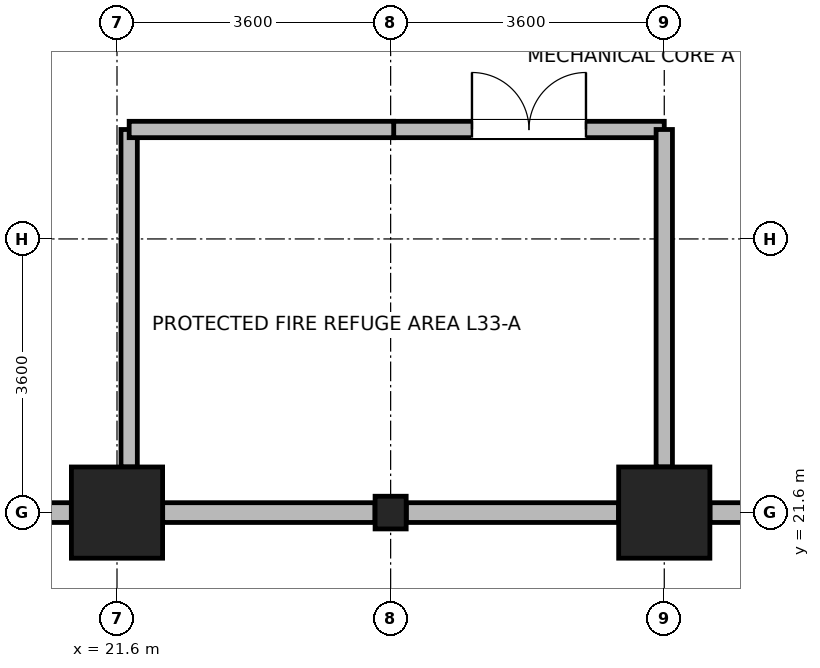
"""IFC4 building model, lengths in metres.
Left out: names, types, materials, properties, quantities, classifications, styles, units other than length and angle.
Written with IfcOpenShell. Run it as: python <this file> out.ifc"""

import sys

from ifc_helpers import new_model, si_unit, direction, frame, frame_2d, origin, origin_2d, place, context, subcontext, project, spatial, rectangle, i_section, extrude, source, transform, mapped, element, fill, save


model = new_model("IFC4")
c1 = context("Model", 3, precision=1e-05, world=origin(), true_north=direction((0.0, 1.0)))
c2 = subcontext(c1, "Body", "Model", "MODEL_VIEW")
j1 = project(units=[si_unit("LENGTHUNIT", "METRE"), si_unit("PLANEANGLEUNIT", "RADIAN")], contexts=[c1])
p1 = place(None, origin())
s1 = spatial("IfcSite", under=j1, at=p1, CompositionType="ELEMENT")
p2 = place(p1, origin())
s2 = spatial("IfcBuilding", under=s1, at=p2, CompositionType="ELEMENT")
p3 = place(p2, frame((0.0, 0.0, 130.4)))
s3 = spatial("IfcBuildingStorey", under=s2, at=p3, CompositionType="ELEMENT", Elevation=130.4)
m1 = source(origin(), c2, "Body", "SweptSolid", [
    extrude(rectangle(XDim=1.2, YDim=1.2, at=origin_2d()), origin(), (0.0, 0.0, 1.0), 5.2),
])
for number, where, z_axis, x_axis in (
    (1, (21.6, 21.6, 0.0), (0.0, 0.0, 1.0), (1.0, 0.0, 0.0)),
    (2, (28.8, 21.6, 0.0), (0.0, 0.0, 1.0), (1.0, 0.0, 0.0)),
):
    element("IfcColumn", number, at=place(p3, frame(where, z_axis=z_axis, x_axis=x_axis)), inside=s3, PredefinedType="COLUMN", context=c2, shape_type="MappedRepresentation", body=[
        mapped(m1, transform((0.0, 0.0, 0.0), x_axis=(1.0, 0.0, 0.0), y_axis=(0.0, 1.0, 0.0), z_axis=(0.0, 0.0, 1.0), scale=1.0)),
    ])
m2 = source(origin(), c2, "Body", "SweptSolid", [
    extrude(i_section(OverallWidth=0.409, OverallDepth=0.43, WebThickness=0.024, FlangeThickness=0.033, FilletRadius=0.015, at=origin_2d()), origin(), (0.0, 0.0, 1.0), 5.2),
])
p4 = place(p3, frame((25.2, 21.6, 0.0), z_axis=(0.0, 0.0, 1.0), x_axis=(1.0, 0.0, 0.0)))
e3 = element("IfcColumn", 3, at=p4, inside=s3, PredefinedType="COLUMN", context=c2, shape_type="MappedRepresentation", body=[
    mapped(m2, transform((0.0, 0.0, 0.0), x_axis=(1.0, 0.0, 0.0), y_axis=(0.0, 1.0, 0.0), z_axis=(0.0, 0.0, 1.0), scale=1.0)),
])
for number, where, z_axis, x_axis in (
    (4, (20.999, 21.6, 0.0), (0.0, 0.0, 1.0), (-1.0, 0.0, 0.0)),
    (5, (24.994, 21.6, 0.0), (0.0, 0.0, 1.0), (-1.0, 0.0, 0.0)),
    (6, (28.199, 21.6, 0.0), (0.0, 0.0, 1.0), (-1.0, 0.0, 0.0)),
):
    element("IfcWall", number, at=place(p3, frame(where, z_axis=z_axis, x_axis=x_axis)), inside=s3, PredefinedType="STANDARD", context=c2, shape_type="SweptSolid", body=[
        extrude(rectangle(XDim=2.793, YDim=0.26, at=frame_2d((1.397, 0.0))), origin(), (0.0, 0.0, 1.0), 2.96),
    ])
p5 = place(p3, frame((31.765, 21.6, 0.0), z_axis=(0.0, 0.0, 1.0), x_axis=(-1.0, 0.0, 0.0)))
e7 = element("IfcWall", 7, at=p5, inside=s3, PredefinedType="STANDARD", context=c2, shape_type="SweptSolid", body=[
    extrude(rectangle(XDim=2.364, YDim=0.26, at=frame_2d((1.182, 0.0))), origin(), (0.0, 0.0, 1.0), 2.96),
])
p6 = place(p3, frame((25.24, 26.64, 0.0), z_axis=(0.0, 0.0, 1.0), x_axis=(1.0, 0.0, 0.0)))
e8 = element("IfcWall", 8, at=p6, inside=s3, PredefinedType="PARTITIONING", context=c2, shape_type="SweptSolid", body=[
    extrude(rectangle(XDim=3.56, YDim=0.215, at=frame_2d((1.78, 0.0))), origin(), (0.0, 0.0, 1.0), 4.76),
])
p7 = place(p6, frame((1.03, 0.0, 0.0)))
e9 = element("IfcOpeningElement", 9, at=p7, cuts=e8, PredefinedType="OPENING", context=c2, shape_type="SweptSolid", body=[
    extrude(rectangle(XDim=1.5, YDim=2.1, at=frame_2d((0.75, 1.05))), frame((0.0, 0.118, 0.0), z_axis=(0.0, -1.0, 0.0), x_axis=(1.0, 0.0, 0.0)), (0.0, 0.0, 1.0), 0.235),
])
p8 = place(p3, frame((21.76, 22.2, 0.0), z_axis=(0.0, 0.0, 1.0), x_axis=(0.0, 1.0, 0.0)))
e10 = element("IfcWall", 10, at=p8, inside=s3, PredefinedType="PARTITIONING", context=c2, shape_type="SweptSolid", body=[
    extrude(rectangle(XDim=4.44, YDim=0.215, at=frame_2d((2.22, 0.0))), origin(), (0.0, 0.0, 1.0), 3.16),
])
p9 = place(p3, frame((28.8, 22.2, 0.0), z_axis=(0.0, 0.0, 1.0), x_axis=(0.0, 1.0, 0.0)))
e11 = element("IfcWall", 11, at=p9, inside=s3, PredefinedType="PARTITIONING", context=c2, shape_type="SweptSolid", body=[
    extrude(rectangle(XDim=4.44, YDim=0.215, at=frame_2d((2.22, 0.0))), origin(), (0.0, 0.0, 1.0), 2.96),
])
p10 = place(p3, frame((21.76, 26.64, 0.0), z_axis=(0.0, 0.0, 1.0), x_axis=(1.0, 0.0, 0.0)))
e12 = element("IfcWall", 12, at=p10, inside=s3, PredefinedType="PARTITIONING", context=c2, shape_type="SweptSolid", body=[
    extrude(rectangle(XDim=3.48, YDim=0.215, at=frame_2d((1.74, 0.0))), origin(), (0.0, 0.0, 1.0), 4.76),
])
p11 = place(p7, origin())
e13 = element("IfcDoor", 13, at=p11, inside=s3, OperationType="DOUBLE_DOOR_SINGLE_SWING", PredefinedType="DOOR", context=c2, shape_type="SweptSolid", body=[
    extrude(rectangle(XDim=1.5, YDim=2.1, at=frame_2d((0.75, 1.05))), frame((0.0, 0.025, 0.0), z_axis=(0.0, -1.0, 0.0), x_axis=(1.0, 0.0, 0.0)), (0.0, 0.0, 1.0), 0.05),
])
fill(e9, e13)
save(model, sys.argv[1])
